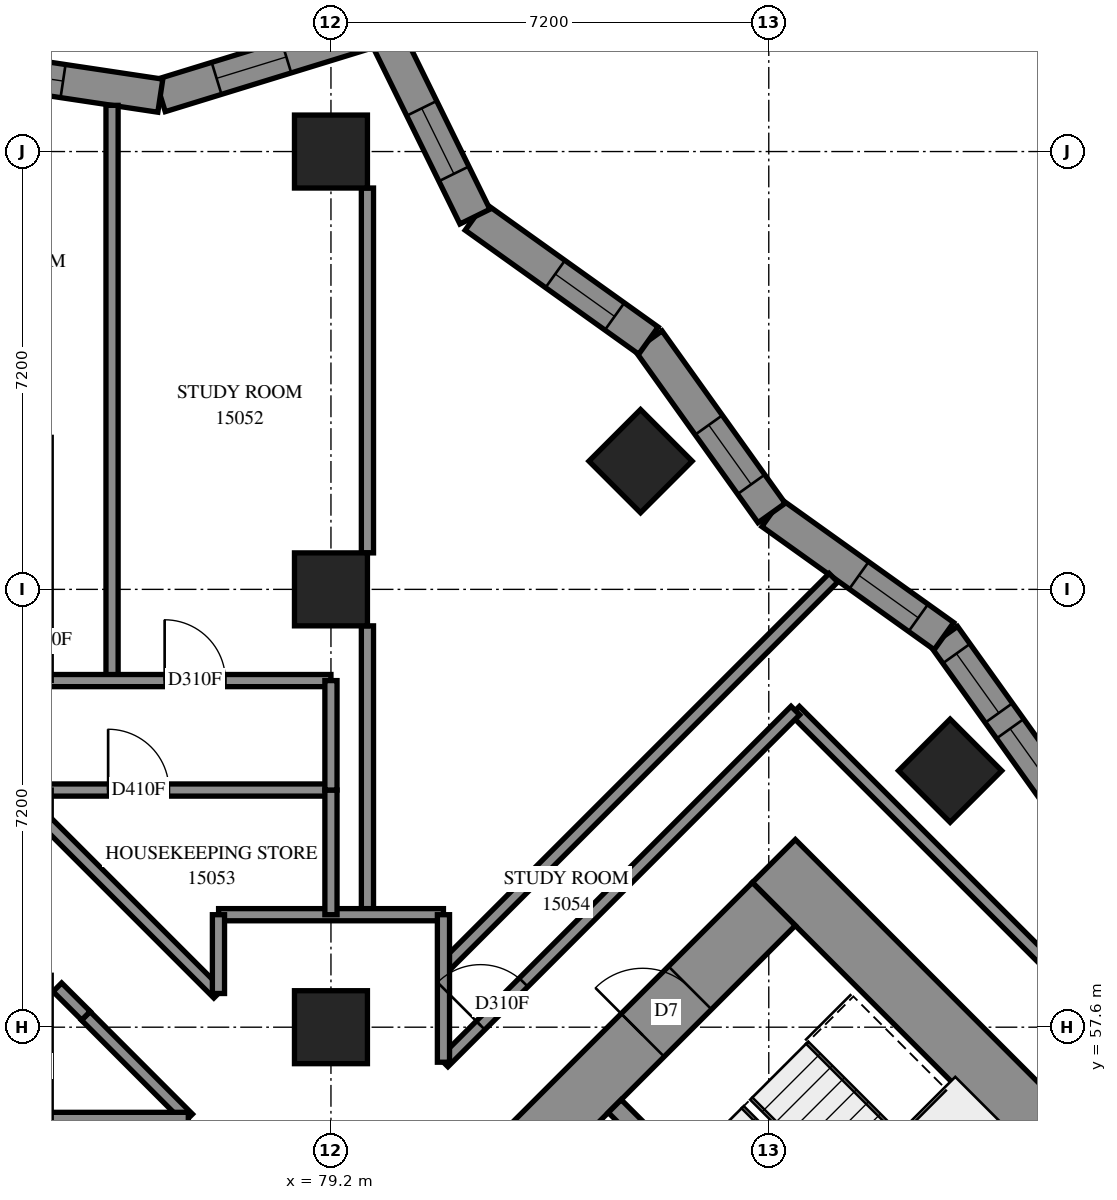
"""IFC4 building model, lengths in metres.
Left out: names, types, materials, properties, quantities, classifications, styles, units other than length and angle.
Written with IfcOpenShell. Run it as: python <this file> out.ifc"""

import sys

from ifc_helpers import new_model, si_unit, direction, frame, frame_2d, origin, origin_2d, place, context, subcontext, project, spatial, polyline, rectangle, outline, extrude, element, fill, save


model = new_model("IFC4")
c1 = context("Model", 3, precision=1e-05, world=origin(), true_north=direction((0.0, 1.0)))
c2 = subcontext(c1, "Body", "Model", "MODEL_VIEW")
j1 = project(units=[si_unit("LENGTHUNIT", "METRE"), si_unit("PLANEANGLEUNIT", "RADIAN")], contexts=[c1])
p1 = place(None, origin())
s1 = spatial("IfcSite", under=j1, at=p1, CompositionType="ELEMENT")
p2 = place(p1, origin())
s2 = spatial("IfcBuilding", under=s1, at=p2, CompositionType="ELEMENT")
p3 = place(p2, frame((0.0, 0.0, 57.6)))
s3 = spatial("IfcBuildingStorey", under=s2, at=p3, CompositionType="ELEMENT", Elevation=57.6)
for number, where, z_axis, x_axis in (
    (1, (79.2, 57.6, 0.0), (0.0, 0.0, 1.0), (1.0, 0.0, 0.0)),
    (2, (79.2, 64.8, 0.0), (0.0, 0.0, 1.0), (1.0, 0.0, 0.0)),
    (3, (79.2, 72.0, 0.0), (0.0, 0.0, 1.0), (1.0, 0.0, 0.0)),
    (4, (84.291, 66.909, 0.0), (0.0, 0.0, 1.0), (0.707, -0.707, 0.0)),
    (5, (89.382, 61.818, 0.0), (0.0, 0.0, 1.0), (0.707, -0.707, 0.0)),
):
    element("IfcColumn", number, at=place(p3, frame(where, z_axis=z_axis, x_axis=x_axis)), inside=s3, PredefinedType="COLUMN", context=c2, shape_type="SweptSolid", body=[
        extrude(rectangle(XDim=1.2, YDim=1.2, at=origin_2d()), origin(), (0.0, 0.0, 1.0), 3.1),
    ])
p4 = place(p3, frame((86.483, 60.333, -0.3), z_axis=(0.0, 0.0, 1.0), x_axis=(0.70710983, -0.7071037324, 0.0)))
e6 = element("IfcWall", 6, at=p4, inside=s3, PredefinedType="SHEAR", context=c2, shape_type="SweptSolid", body=[
    extrude(rectangle(XDim=16.4, YDim=1.0, at=frame_2d((8.2, 0.0))), origin(), (0.0, 0.0, 1.0), 2.7),
])
p5 = place(p4, frame((11.0, 0.0, 0.3)))
e7 = element("IfcOpeningElement", 7, at=p5, cuts=e6, PredefinedType="OPENING", context=c2, shape_type="SweptSolid", body=[
    extrude(rectangle(XDim=0.8, YDim=2.1, at=frame_2d((0.4, 1.05))), frame((0.0, 0.51, 0.0), z_axis=(0.0, -1.0, 0.0), x_axis=(1.0, 0.0, 0.0)), (0.0, 0.0, 1.0), 1.02),
])
p6 = place(p3, frame((76.301, 49.443, -0.3), z_axis=(0.0, 0.0, 1.0), x_axis=(0.7071067812, 0.7071067812, 0.0)))
e8 = element("IfcWall", 8, at=p6, inside=s3, PredefinedType="SHEAR", context=c2, shape_type="SweptSolid", body=[
    extrude(rectangle(XDim=14.4, YDim=1.0, at=frame_2d((7.2, 0.0))), origin(), (0.0, 0.0, 1.0), 2.7),
])
p7 = place(p6, frame((4.55, 0.0, 0.3)))
e9 = element("IfcOpeningElement", 9, at=p7, cuts=e8, PredefinedType="OPENING", context=c2, shape_type="SweptSolid", body=[
    extrude(rectangle(XDim=1.1, YDim=2.1, at=frame_2d((0.55, 1.05))), frame((0.0, 0.51, 0.0), z_axis=(0.0, -1.0, 0.0), x_axis=(1.0, 0.0, 0.0)), (0.0, 0.0, 1.0), 1.02),
])
p8 = place(p6, frame((11.35, 0.0, 0.3)))
e10 = element("IfcOpeningElement", 10, at=p8, cuts=e8, PredefinedType="OPENING", context=c2, shape_type="SweptSolid", body=[
    extrude(rectangle(XDim=1.1, YDim=2.1, at=frame_2d((0.55, 1.05))), frame((0.0, 0.51, 0.0), z_axis=(0.0, -1.0, 0.0), x_axis=(1.0, 0.0, 0.0)), (0.0, 0.0, 1.0), 1.02),
])
p9 = place(p3, frame((83.867, 56.302, 0.0), z_axis=(0.0, 0.0, 1.0), x_axis=(0.7071137256, -0.7070998367, 0.0)))
e11 = element("IfcWall", 11, at=p9, inside=s3, PredefinedType="SOLIDWALL", context=c2, shape_type="SweptSolid", body=[
    extrude(rectangle(XDim=7.2, YDim=0.3, at=frame_2d((3.6, 0.0))), origin(), (0.0, 0.0, 1.0), 3.1),
])
p10 = place(p3, frame((91.306, 61.197, 0.0), z_axis=(0.0, 0.0, 1.0), x_axis=(-0.5813956737, 0.8136209625, 0.0)))
e12 = element("IfcWall", 12, at=p10, inside=s3, PredefinedType="SOLIDWALL", context=c2, shape_type="SweptSolid", body=[
    extrude(outline(polyline([(0.046, -0.275), (3.53, -0.275), (3.438, 0.275), (-0.046, 0.275), (0.046, -0.275)])), origin(), (0.0, 0.0, 1.0), 3.1),
])
p11 = place(p10, frame((0.412, 0.0, 0.5)))
e13 = element("IfcOpeningElement", 13, at=p11, cuts=e12, PredefinedType="OPENING", context=c2, shape_type="SweptSolid", body=[
    extrude(rectangle(XDim=1.2, YDim=2.45, at=frame_2d((0.6, 1.225))), frame((0.0, 0.285, 0.0), z_axis=(0.0, -1.0, 0.0), x_axis=(1.0, 0.0, 0.0)), (0.0, 0.0, 1.0), 0.57),
])
p12 = place(p10, frame((1.931, 0.0, 0.5)))
e14 = element("IfcOpeningElement", 14, at=p12, cuts=e12, PredefinedType="OPENING", context=c2, shape_type="SweptSolid", body=[
    extrude(rectangle(XDim=1.2, YDim=2.45, at=frame_2d((0.6, 1.225))), frame((0.0, 0.285, 0.0), z_axis=(0.0, -1.0, 0.0), x_axis=(1.0, 0.0, 0.0)), (0.0, 0.0, 1.0), 0.57),
])
p13 = place(p3, frame((89.281, 64.031, 0.0), z_axis=(0.0, 0.0, 1.0), x_axis=(-0.8136209625, 0.5813956737, 0.0)))
e15 = element("IfcWall", 15, at=p13, inside=s3, PredefinedType="SOLIDWALL", context=c2, shape_type="SweptSolid", body=[
    extrude(outline(polyline([(-0.046, -0.275), (3.438, -0.275), (3.53, 0.275), (0.046, 0.275), (-0.046, -0.275)])), origin(), (0.0, 0.0, 1.0), 3.1),
])
p14 = place(p13, frame((0.518, 0.0, 0.5)))
e16 = element("IfcOpeningElement", 16, at=p14, cuts=e15, PredefinedType="OPENING", context=c2, shape_type="SweptSolid", body=[
    extrude(rectangle(XDim=1.2, YDim=2.45, at=frame_2d((0.6, 1.225))), frame((0.0, 0.285, 0.0), z_axis=(0.0, -1.0, 0.0), x_axis=(1.0, 0.0, 0.0)), (0.0, 0.0, 1.0), 0.57),
])
p15 = place(p3, frame((86.446, 66.056, 0.0), z_axis=(0.0, 0.0, 1.0), x_axis=(-0.5813956737, 0.8136209625, 0.0)))
e17 = element("IfcWall", 17, at=p15, inside=s3, PredefinedType="SOLIDWALL", context=c2, shape_type="SweptSolid", body=[
    extrude(outline(polyline([(0.046, -0.275), (3.53, -0.275), (3.438, 0.275), (-0.046, 0.275), (0.046, -0.275)])), origin(), (0.0, 0.0, 1.0), 3.1),
])
p16 = place(p15, frame((0.578, 0.0, 0.5)))
e18 = element("IfcOpeningElement", 18, at=p16, cuts=e17, PredefinedType="OPENING", context=c2, shape_type="SweptSolid", body=[
    extrude(rectangle(XDim=1.2, YDim=2.45, at=frame_2d((0.6, 1.225))), frame((0.0, 0.285, 0.0), z_axis=(0.0, -1.0, 0.0), x_axis=(1.0, 0.0, 0.0)), (0.0, 0.0, 1.0), 0.57),
])
p17 = place(p3, frame((84.421, 68.891, 0.0), z_axis=(0.0, 0.0, 1.0), x_axis=(-0.8136140083, 0.5814054054, 0.0)))
e19 = element("IfcWall", 19, at=p17, inside=s3, PredefinedType="SOLIDWALL", context=c2, shape_type="SweptSolid", body=[
    extrude(outline(polyline([(-0.046, -0.275), (3.438, -0.275), (3.576, 0.275), (0.046, 0.275), (-0.046, -0.275)])), origin(), (0.0, 0.0, 1.0), 3.1),
])
p18 = place(p17, frame((0.684, 0.0, 0.5)))
e20 = element("IfcOpeningElement", 20, at=p18, cuts=e19, PredefinedType="OPENING", context=c2, shape_type="SweptSolid", body=[
    extrude(rectangle(XDim=1.2, YDim=2.45, at=frame_2d((0.6, 1.225))), frame((0.0, 0.285, 0.0), z_axis=(0.0, -1.0, 0.0), x_axis=(1.0, 0.0, 0.0)), (0.0, 0.0, 1.0), 0.57),
])
p19 = place(p3, frame((81.567, 70.93, 0.0), z_axis=(0.0, 0.0, 1.0), x_axis=(-0.4410046113, 0.8975048372, 0.0)))
e21 = element("IfcWall", 21, at=p19, inside=s3, PredefinedType="SOLIDWALL", context=c2, shape_type="SweptSolid", body=[
    extrude(outline(polyline([(0.069, -0.275), (3.7, -0.275), (3.231, 0.275), (-0.069, 0.275), (0.069, -0.275)])), origin(), (0.0, 0.0, 1.0), 3.1),
])
p20 = place(p19, frame((0.784, 0.0, 0.5)))
e22 = element("IfcOpeningElement", 22, at=p20, cuts=e21, PredefinedType="OPENING", context=c2, shape_type="SweptSolid", body=[
    extrude(rectangle(XDim=1.2, YDim=2.45, at=frame_2d((0.6, 1.225))), frame((0.0, 0.285, 0.0), z_axis=(0.0, -1.0, 0.0), x_axis=(1.0, 0.0, 0.0)), (0.0, 0.0, 1.0), 0.57),
])
p21 = place(p3, frame((80.039, 74.04, 0.0), z_axis=(0.0, 0.0, 1.0), x_axis=(-0.9557960147, -0.2940305738, 0.0)))
e23 = element("IfcWall", 23, at=p21, inside=s3, PredefinedType="SOLIDWALL", context=c2, shape_type="SweptSolid", body=[
    extrude(outline(polyline([(-0.235, -0.275), (3.751, -0.275), (3.876, 0.275), (0.235, 0.275), (-0.235, -0.275)])), origin(), (0.0, 0.0, 1.0), 3.1),
])
p22 = place(p21, frame((1.646, 0.0, 0.5)))
e24 = element("IfcOpeningElement", 24, at=p22, cuts=e23, PredefinedType="OPENING", context=c2, shape_type="SweptSolid", body=[
    extrude(rectangle(XDim=1.2, YDim=2.45, at=frame_2d((0.6, 1.225))), frame((0.0, 0.285, 0.0), z_axis=(0.0, -1.0, 0.0), x_axis=(1.0, 0.0, 0.0)), (0.0, 0.0, 1.0), 0.57),
])
p23 = place(p3, frame((76.394, 72.919, 0.0), z_axis=(0.0, 0.0, 1.0), x_axis=(-0.9889175987, 0.1484654269, 0.0)))
e25 = element("IfcWall", 25, at=p23, inside=s3, PredefinedType="SOLIDWALL", context=c2, shape_type="SweptSolid", body=[
    extrude(outline(polyline([(0.063, -0.275), (3.915, -0.275), (3.832, 0.275), (-0.063, 0.275), (0.063, -0.275)])), origin(), (0.0, 0.0, 1.0), 3.1),
])
p24 = place(p23, frame((1.618, 0.0, 0.5)))
e26 = element("IfcOpeningElement", 26, at=p24, cuts=e25, PredefinedType="OPENING", context=c2, shape_type="SweptSolid", body=[
    extrude(rectangle(XDim=1.2, YDim=2.45, at=frame_2d((0.6, 1.225))), frame((0.0, 0.285, 0.0), z_axis=(0.0, -1.0, 0.0), x_axis=(1.0, 0.0, 0.0)), (0.0, 0.0, 1.0), 0.57),
])
p25 = place(p3, frame((86.833, 62.805, 0.0), z_axis=(0.0, 0.0, 1.0), x_axis=(0.7072045138, -0.7070090351, 0.0)))
e27 = element("IfcWall", 27, at=p25, inside=s3, PredefinedType="PARTITIONING", context=c2, shape_type="SweptSolid", body=[
    extrude(rectangle(XDim=13.301, YDim=0.2, at=frame_2d((6.65, 0.0))), origin(), (0.0, 0.0, 1.0), 3.1),
])
p26 = place(p25, frame((10.586, 0.0, 0.0)))
e28 = element("IfcOpeningElement", 28, at=p26, cuts=e27, PredefinedType="OPENING", context=c2, shape_type="SweptSolid", body=[
    extrude(rectangle(XDim=1.0, YDim=2.1, at=frame_2d((0.5, 1.05))), frame((0.0, 0.11, 0.0), z_axis=(0.0, -1.0, 0.0), x_axis=(1.0, 0.0, 0.0)), (0.0, 0.0, 1.0), 0.22),
])
p27 = place(p3, frame((75.6, 63.3, 0.0), z_axis=(0.0, 0.0, 1.0), x_axis=(0.0, 1.0, 0.0)))
e29 = element("IfcWall", 29, at=p27, inside=s3, PredefinedType="PARTITIONING", context=c2, shape_type="SweptSolid", body=[
    extrude(rectangle(XDim=9.46, YDim=0.2, at=frame_2d((4.73, 0.0))), origin(), (0.0, 0.0, 1.0), 3.1),
])
p28 = place(p3, frame((81.049, 58.577, 0.0), z_axis=(0.0, 0.0, 1.0), x_axis=(0.7071122929, 0.7071012694, 0.0)))
e30 = element("IfcWall", 30, at=p28, inside=s3, PredefinedType="PARTITIONING", context=c2, shape_type="SweptSolid", body=[
    extrude(rectangle(XDim=9.072, YDim=0.2, at=frame_2d((4.536, 0.0))), origin(), (0.0, 0.0, 1.0), 3.1),
])
p29 = place(p3, frame((81.053, 57.021, 0.0), z_axis=(0.0, 0.0, 1.0), x_axis=(0.7069845395, 0.7072290017, 0.0)))
e31 = element("IfcWall", 31, at=p29, inside=s3, PredefinedType="PARTITIONING", context=c2, shape_type="SweptSolid", body=[
    extrude(rectangle(XDim=8.181, YDim=0.2, at=frame_2d((4.091, 0.0))), origin(), (0.0, 0.0, 1.0), 3.1),
])
p30 = place(p29, frame((0.86, 0.0, 0.0)))
e32 = element("IfcOpeningElement", 32, at=p30, cuts=e31, PredefinedType="OPENING", context=c2, shape_type="SweptSolid", body=[
    extrude(rectangle(XDim=1.0, YDim=2.1, at=frame_2d((0.5, 1.05))), frame((0.0, 0.11, 0.0), z_axis=(0.0, -1.0, 0.0), x_axis=(1.0, 0.0, 0.0)), (0.0, 0.0, 1.0), 0.22),
])
p31 = place(p3, frame((79.8, 65.4, 0.0), z_axis=(0.0, 0.0, 1.0), x_axis=(0.0, 1.0, 0.0)))
e33 = element("IfcWall", 33, at=p31, inside=s3, PredefinedType="PARTITIONING", context=c2, shape_type="SweptSolid", body=[
    extrude(rectangle(XDim=6.0, YDim=0.2, at=frame_2d((3.0, 0.0))), origin(), (0.0, 0.0, 1.0), 3.1),
])
p32 = place(p3, frame((79.8, 59.45, 0.0), z_axis=(0.0, 0.0, 1.0), x_axis=(0.0, 1.0, 0.0)))
e34 = element("IfcWall", 34, at=p32, inside=s3, PredefinedType="PARTITIONING", context=c2, shape_type="SweptSolid", body=[
    extrude(rectangle(XDim=4.75, YDim=0.2, at=frame_2d((2.375, 0.0))), origin(), (0.0, 0.0, 1.0), 3.1),
])
p33 = place(p3, frame((74.502, 63.3, 0.0), z_axis=(0.0, 0.0, 1.0), x_axis=(1.0, 0.0, 0.0)))
e35 = element("IfcWall", 35, at=p33, inside=s3, PredefinedType="PARTITIONING", context=c2, shape_type="SweptSolid", body=[
    extrude(rectangle(XDim=4.698, YDim=0.2, at=frame_2d((2.349, 0.0))), origin(), (0.0, 0.0, 1.0), 3.1),
])
p34 = place(p33, frame((1.963, 0.0, 0.0)))
e36 = element("IfcOpeningElement", 36, at=p34, cuts=e35, PredefinedType="OPENING", context=c2, shape_type="SweptSolid", body=[
    extrude(rectangle(XDim=1.0, YDim=2.1, at=frame_2d((0.5, 1.05))), frame((0.0, 0.11, 0.0), z_axis=(0.0, -1.0, 0.0), x_axis=(1.0, 0.0, 0.0)), (0.0, 0.0, 1.0), 0.22),
])
p35 = place(p3, frame((74.502, 61.5, 0.0), z_axis=(0.0, 0.0, 1.0), x_axis=(1.0, 0.0, 0.0)))
e37 = element("IfcWall", 37, at=p35, inside=s3, PredefinedType="PARTITIONING", context=c2, shape_type="SweptSolid", body=[
    extrude(rectangle(XDim=4.698, YDim=0.2, at=frame_2d((2.349, 0.0))), origin(), (0.0, 0.0, 1.0), 3.1),
])
p36 = place(p35, frame((1.034, 0.0, 0.0)))
e38 = element("IfcOpeningElement", 38, at=p36, cuts=e37, PredefinedType="OPENING", context=c2, shape_type="SweptSolid", body=[
    extrude(rectangle(XDim=1.0, YDim=2.1, at=frame_2d((0.5, 1.05))), frame((0.0, 0.11, 0.0), z_axis=(0.0, -1.0, 0.0), x_axis=(1.0, 0.0, 0.0)), (0.0, 0.0, 1.0), 0.22),
])
p37 = place(p3, frame((74.497, 60.999, 0.0), z_axis=(0.0, 0.0, 1.0), x_axis=(0.7071067812, -0.7071067812, 0.0)))
e39 = element("IfcWall", 39, at=p37, inside=s3, PredefinedType="PARTITIONING", context=c2, shape_type="SweptSolid", body=[
    extrude(rectangle(XDim=4.028, YDim=0.2, at=frame_2d((2.014, 0.0))), origin(), (0.0, 0.0, 1.0), 3.1),
])
p38 = place(p3, frame((77.352, 59.45, 0.0), z_axis=(0.0, 0.0, 1.0), x_axis=(1.0, 0.0, 0.0)))
e40 = element("IfcWall", 40, at=p38, inside=s3, PredefinedType="PARTITIONING", context=c2, shape_type="SweptSolid", body=[
    extrude(rectangle(XDim=3.698, YDim=0.2, at=frame_2d((1.849, 0.0))), origin(), (0.0, 0.0, 1.0), 3.1),
])
p39 = place(p3, frame((81.05, 57.024, 0.0), z_axis=(0.0, 0.0, 1.0), x_axis=(0.0, 1.0, 0.0)))
e41 = element("IfcWall", 41, at=p39, inside=s3, PredefinedType="PARTITIONING", context=c2, shape_type="SweptSolid", body=[
    extrude(rectangle(XDim=2.426, YDim=0.2, at=frame_2d((1.213, 0.0))), origin(), (0.0, 0.0, 1.0), 3.1),
])
p40 = place(p3, frame((75.168, 57.786, 0.0), z_axis=(0.0, 0.0, 1.0), x_axis=(0.7066870088, -0.7075263045, 0.0)))
e42 = element("IfcWall", 42, at=p40, inside=s3, PredefinedType="PARTITIONING", context=c2, shape_type="SweptSolid", body=[
    extrude(rectangle(XDim=2.383, YDim=0.2, at=frame_2d((1.192, 0.0))), origin(), (0.0, 0.0, 1.0), 3.1),
])
p41 = place(p3, frame((74.502, 56.1, 0.0), z_axis=(0.0, 0.0, 1.0), x_axis=(1.0, 0.0, 0.0)))
e43 = element("IfcWall", 43, at=p41, inside=s3, PredefinedType="PARTITIONING", context=c2, shape_type="SweptSolid", body=[
    extrude(rectangle(XDim=2.352, YDim=0.2, at=frame_2d((1.176, 0.0))), origin(), (0.0, 0.0, 1.0), 3.1),
])
p42 = place(p3, frame((79.2, 59.45, 0.0), z_axis=(0.0, 0.0, 1.0), x_axis=(0.0, 1.0, 0.0)))
e44 = element("IfcWall", 44, at=p42, inside=s3, PredefinedType="PARTITIONING", context=c2, shape_type="SweptSolid", body=[
    extrude(rectangle(XDim=2.05, YDim=0.2, at=frame_2d((1.025, 0.0))), origin(), (0.0, 0.0, 1.0), 3.1),
])
p43 = place(p3, frame((79.2, 61.5, 0.0), z_axis=(0.0, 0.0, 1.0), x_axis=(0.0, 1.0, 0.0)))
e45 = element("IfcWall", 45, at=p43, inside=s3, PredefinedType="PARTITIONING", context=c2, shape_type="SweptSolid", body=[
    extrude(rectangle(XDim=1.8, YDim=0.2, at=frame_2d((0.9, 0.0))), origin(), (0.0, 0.0, 1.0), 3.1),
])
p44 = place(p3, frame((77.35, 58.154, 0.0), z_axis=(0.0, 0.0, 1.0), x_axis=(0.0, 1.0, 0.0)))
e46 = element("IfcWall", 46, at=p44, inside=s3, PredefinedType="PARTITIONING", context=c2, shape_type="SweptSolid", body=[
    extrude(rectangle(XDim=1.296, YDim=0.2, at=frame_2d((0.648, 0.0))), origin(), (0.0, 0.0, 1.0), 3.1),
])
p45 = place(p3, frame((74.701, 58.257, 0.0), z_axis=(0.0, 0.0, 1.0), x_axis=(0.7086128608, -0.7055974869, 0.0)))
e47 = element("IfcWall", 47, at=p45, inside=s3, PredefinedType="PARTITIONING", context=c2, shape_type="SweptSolid", body=[
    extrude(rectangle(XDim=0.663, YDim=0.2, at=frame_2d((0.332, 0.0))), origin(), (0.0, 0.0, 1.0), 3.1),
])
p46 = place(p11, origin())
e48 = element("IfcWindow", 48, at=p46, inside=s3, PartitioningType="SINGLE_PANEL", PredefinedType="WINDOW", context=c2, shape_type="SweptSolid", body=[
    extrude(rectangle(XDim=1.2, YDim=2.45, at=frame_2d((0.6, 1.225))), frame((0.0, 0.155, 0.0), z_axis=(0.0, -1.0, 0.0), x_axis=(1.0, 0.0, 0.0)), (0.0, 0.0, 1.0), 0.06),
])
fill(e13, e48)
p47 = place(p12, origin())
e49 = element("IfcWindow", 49, at=p47, inside=s3, PartitioningType="SINGLE_PANEL", PredefinedType="WINDOW", context=c2, shape_type="SweptSolid", body=[
    extrude(rectangle(XDim=1.2, YDim=2.45, at=frame_2d((0.6, 1.225))), frame((0.0, 0.155, 0.0), z_axis=(0.0, -1.0, 0.0), x_axis=(1.0, 0.0, 0.0)), (0.0, 0.0, 1.0), 0.06),
])
fill(e14, e49)
p48 = place(p14, origin())
e50 = element("IfcWindow", 50, at=p48, inside=s3, PartitioningType="SINGLE_PANEL", PredefinedType="WINDOW", context=c2, shape_type="SweptSolid", body=[
    extrude(rectangle(XDim=1.2, YDim=2.45, at=frame_2d((0.6, 1.225))), frame((0.0, 0.155, 0.0), z_axis=(0.0, -1.0, 0.0), x_axis=(1.0, 0.0, 0.0)), (0.0, 0.0, 1.0), 0.06),
])
fill(e16, e50)
p49 = place(p16, origin())
e51 = element("IfcWindow", 51, at=p49, inside=s3, PartitioningType="SINGLE_PANEL", PredefinedType="WINDOW", context=c2, shape_type="SweptSolid", body=[
    extrude(rectangle(XDim=1.2, YDim=2.45, at=frame_2d((0.6, 1.225))), frame((0.0, 0.155, 0.0), z_axis=(0.0, -1.0, 0.0), x_axis=(1.0, 0.0, 0.0)), (0.0, 0.0, 1.0), 0.06),
])
fill(e18, e51)
p50 = place(p18, origin())
e52 = element("IfcWindow", 52, at=p50, inside=s3, PartitioningType="SINGLE_PANEL", PredefinedType="WINDOW", context=c2, shape_type="SweptSolid", body=[
    extrude(rectangle(XDim=1.2, YDim=2.45, at=frame_2d((0.6, 1.225))), frame((0.0, 0.155, 0.0), z_axis=(0.0, -1.0, 0.0), x_axis=(1.0, 0.0, 0.0)), (0.0, 0.0, 1.0), 0.06),
])
fill(e20, e52)
p51 = place(p20, origin())
e53 = element("IfcWindow", 53, at=p51, inside=s3, PartitioningType="SINGLE_PANEL", PredefinedType="WINDOW", context=c2, shape_type="SweptSolid", body=[
    extrude(rectangle(XDim=1.2, YDim=2.45, at=frame_2d((0.6, 1.225))), frame((0.0, 0.155, 0.0), z_axis=(0.0, -1.0, 0.0), x_axis=(1.0, 0.0, 0.0)), (0.0, 0.0, 1.0), 0.06),
])
fill(e22, e53)
p52 = place(p22, origin())
e54 = element("IfcWindow", 54, at=p52, inside=s3, PartitioningType="SINGLE_PANEL", PredefinedType="WINDOW", context=c2, shape_type="SweptSolid", body=[
    extrude(rectangle(XDim=1.2, YDim=2.45, at=frame_2d((0.6, 1.225))), frame((0.0, 0.155, 0.0), z_axis=(0.0, -1.0, 0.0), x_axis=(1.0, 0.0, 0.0)), (0.0, 0.0, 1.0), 0.06),
])
fill(e24, e54)
p53 = place(p24, origin())
e55 = element("IfcWindow", 55, at=p53, inside=s3, PartitioningType="SINGLE_PANEL", PredefinedType="WINDOW", context=c2, shape_type="SweptSolid", body=[
    extrude(rectangle(XDim=1.2, YDim=2.45, at=frame_2d((0.6, 1.225))), frame((0.0, 0.155, 0.0), z_axis=(0.0, -1.0, 0.0), x_axis=(1.0, 0.0, 0.0)), (0.0, 0.0, 1.0), 0.06),
])
fill(e26, e55)
p54 = place(p8, origin())
e56 = element("IfcDoor", 56, at=p54, inside=s3, OperationType="SINGLE_SWING_LEFT", PredefinedType="DOOR", context=c2, shape_type="SweptSolid", body=[
    extrude(rectangle(XDim=1.1, YDim=2.1, at=frame_2d((0.55, 1.05))), frame((0.0, 0.025, 0.0), z_axis=(0.0, -1.0, 0.0), x_axis=(1.0, 0.0, 0.0)), (0.0, 0.0, 1.0), 0.05),
])
fill(e10, e56)
p55 = place(p34, origin())
e57 = element("IfcDoor", 57, at=p55, inside=s3, OperationType="SINGLE_SWING_LEFT", PredefinedType="DOOR", context=c2, shape_type="SweptSolid", body=[
    extrude(rectangle(XDim=1.0, YDim=2.1, at=frame_2d((0.5, 1.05))), frame((0.0, 0.025, 0.0), z_axis=(0.0, -1.0, 0.0), x_axis=(1.0, 0.0, 0.0)), (0.0, 0.0, 1.0), 0.05),
])
fill(e36, e57)
p56 = place(p36, origin())
e58 = element("IfcDoor", 58, at=p56, inside=s3, OperationType="SINGLE_SWING_RIGHT", PredefinedType="DOOR", context=c2, shape_type="SweptSolid", body=[
    extrude(rectangle(XDim=1.0, YDim=2.1, at=frame_2d((0.5, 1.05))), frame((0.0, 0.025, 0.0), z_axis=(0.0, -1.0, 0.0), x_axis=(1.0, 0.0, 0.0)), (0.0, 0.0, 1.0), 0.05),
])
fill(e38, e58)
p57 = place(p30, origin())
e59 = element("IfcDoor", 59, at=p57, inside=s3, OperationType="SINGLE_SWING_RIGHT", PredefinedType="DOOR", context=c2, shape_type="SweptSolid", body=[
    extrude(rectangle(XDim=1.0, YDim=2.1, at=frame_2d((0.5, 1.05))), frame((0.0, 0.025, 0.0), z_axis=(0.0, -1.0, 0.0), x_axis=(1.0, 0.0, 0.0)), (0.0, 0.0, 1.0), 0.05),
])
fill(e32, e59)
save(model, sys.argv[1])
